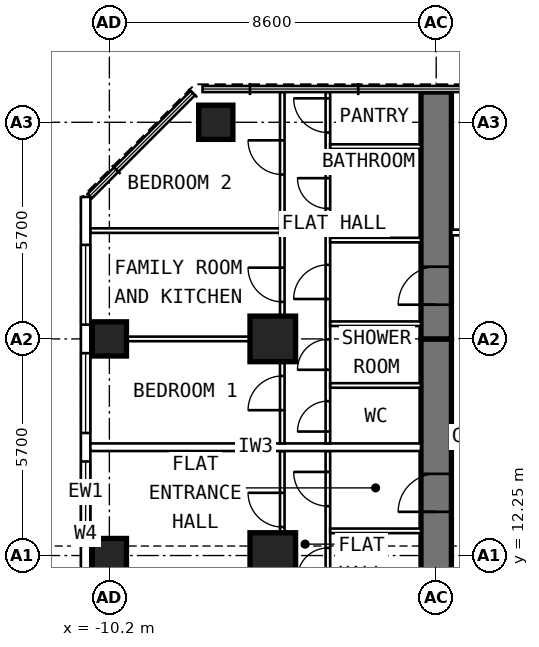
"""IFC4 building model, lengths in metres.
Left out: names, types, materials, properties, quantities, classifications, styles, units other than length and angle.
Written with IfcOpenShell. Run it as: python <this file> out.ifc"""

import sys

from ifc_helpers import new_model, si_unit, direction, frame, frame_2d, origin, origin_2d, place, context, subcontext, project, spatial, rectangle, extrude, element, fill, save


model = new_model("IFC4")
c1 = context("Model", 3, precision=1e-05, world=origin(), true_north=direction((0.0, 1.0)))
c2 = subcontext(c1, "Body", "Model", "MODEL_VIEW")
j1 = project(units=[si_unit("LENGTHUNIT", "METRE"), si_unit("PLANEANGLEUNIT", "RADIAN")], contexts=[c1])
p1 = place(None, origin())
s1 = spatial("IfcSite", under=j1, at=p1, CompositionType="ELEMENT")
p2 = place(p1, origin())
s2 = spatial("IfcBuilding", under=s1, at=p2, CompositionType="ELEMENT")
p3 = place(p2, frame((0.0, 0.0, 165.2)))
s3 = spatial("IfcBuildingStorey", under=s2, at=p3, CompositionType="ELEMENT", Elevation=165.2)
for number, where, z_axis, x_axis in (
    (1, (-10.2, 12.25, 0.0), (0.0, 0.0, 1.0), (0.0, 1.0, 0.0)),
    (2, (-10.2, 17.95, 0.0), (0.0, 0.0, 1.0), (0.0, 1.0, 0.0)),
    (3, (-7.4, 23.65, 0.0), (0.0, 0.0, 1.0), (0.0, 1.0, 0.0)),
):
    element("IfcColumn", number, at=place(p3, frame(where, z_axis=z_axis, x_axis=x_axis)), inside=s3, PredefinedType="COLUMN", context=c2, shape_type="SweptSolid", body=[
        extrude(rectangle(XDim=0.9, YDim=0.9, at=origin_2d()), origin(), (0.0, 0.0, 1.0), 3.6),
    ])
for number, where, z_axis, x_axis in (
    (4, (-5.9, 12.25, 0.0), (0.0, 0.0, 1.0), (0.0, 1.0, 0.0)),
    (5, (-5.9, 17.95, 0.0), (0.0, 0.0, 1.0), (0.0, 1.0, 0.0)),
):
    element("IfcColumn", number, at=place(p3, frame(where, z_axis=z_axis, x_axis=x_axis)), inside=s3, PredefinedType="COLUMN", context=c2, shape_type="SweptSolid", body=[
        extrude(rectangle(XDim=1.2, YDim=1.2, at=origin_2d()), origin(), (0.0, 0.0, 1.0), 3.6),
    ])
p4 = place(p3, frame((-1.6, 9.6, 0.0), z_axis=(0.0, 0.0, 1.0), x_axis=(0.0, 1.0, 0.0)))
e6 = element("IfcWall", 6, at=p4, inside=s3, PredefinedType="SHEAR", context=c2, shape_type="SweptSolid", body=[
    extrude(rectangle(XDim=8.35, YDim=0.8, at=frame_2d((4.175, 0.0))), origin(), (0.0, 0.0, 1.0), 3.6),
])
p5 = place(p4, frame((3.8, 0.0, 0.0)))
e7 = element("IfcOpeningElement", 7, at=p5, cuts=e6, PredefinedType="OPENING", context=c2, shape_type="SweptSolid", body=[
    extrude(rectangle(XDim=1.0, YDim=2.1, at=frame_2d((0.5, 1.05))), frame((0.0, 0.412, 0.0), z_axis=(0.0, -1.0, 0.0), x_axis=(1.0, 0.0, 0.0)), (0.0, 0.0, 1.0), 0.824),
])
p6 = place(p3, frame((-1.6, 17.95, 0.0), z_axis=(0.0, 0.0, 1.0), x_axis=(0.0, 1.0, 0.0)))
e8 = element("IfcWall", 8, at=p6, inside=s3, PredefinedType="SHEAR", context=c2, shape_type="SweptSolid", body=[
    extrude(rectangle(XDim=6.495, YDim=0.8, at=frame_2d((3.248, 0.0))), origin(), (0.0, 0.0, 1.0), 3.6),
])
p7 = place(p6, frame((0.9, 0.0, 0.0)))
e9 = element("IfcOpeningElement", 9, at=p7, cuts=e8, PredefinedType="OPENING", context=c2, shape_type="SweptSolid", body=[
    extrude(rectangle(XDim=1.0, YDim=2.1, at=frame_2d((0.5, 1.05))), frame((0.0, 0.412, 0.0), z_axis=(0.0, -1.0, 0.0), x_axis=(1.0, 0.0, 0.0)), (0.0, 0.0, 1.0), 0.824),
])
p8 = place(p3, frame((-10.825, 6.148, 0.0), z_axis=(0.0, 0.0, 1.0), x_axis=(0.0, 1.0, 0.0)))
e10 = element("IfcWall", 10, at=p8, inside=s3, PredefinedType="SOLIDWALL", context=c2, shape_type="SweptSolid", body=[
    extrude(rectangle(XDim=15.537, YDim=0.25, at=frame_2d((7.769, 0.0))), origin(), (0.0, 0.0, 1.0), 3.35),
])
p9 = place(p8, frame((0.777, 0.0, 0.8)))
e11 = element("IfcOpeningElement", 11, at=p9, cuts=e10, PredefinedType="OPENING", context=c2, shape_type="SweptSolid", body=[
    extrude(rectangle(XDim=2.1, YDim=1.8, at=frame_2d((1.05, 0.9))), frame((0.0, 0.137, 0.0), z_axis=(0.0, -1.0, 0.0), x_axis=(1.0, 0.0, 0.0)), (0.0, 0.0, 1.0), 0.274),
])
p10 = place(p8, frame((3.627, 0.0, 0.8)))
e12 = element("IfcOpeningElement", 12, at=p10, cuts=e10, PredefinedType="OPENING", context=c2, shape_type="SweptSolid", body=[
    extrude(rectangle(XDim=2.1, YDim=1.8, at=frame_2d((1.05, 0.9))), frame((0.0, 0.137, 0.0), z_axis=(0.0, -1.0, 0.0), x_axis=(1.0, 0.0, 0.0)), (0.0, 0.0, 1.0), 0.274),
])
p11 = place(p8, frame((6.477, 0.0, 0.8)))
e13 = element("IfcOpeningElement", 13, at=p11, cuts=e10, PredefinedType="OPENING", context=c2, shape_type="SweptSolid", body=[
    extrude(rectangle(XDim=2.1, YDim=1.8, at=frame_2d((1.05, 0.9))), frame((0.0, 0.137, 0.0), z_axis=(0.0, -1.0, 0.0), x_axis=(1.0, 0.0, 0.0)), (0.0, 0.0, 1.0), 0.274),
])
p12 = place(p8, frame((9.327, 0.0, 0.8)))
e14 = element("IfcOpeningElement", 14, at=p12, cuts=e10, PredefinedType="OPENING", context=c2, shape_type="SweptSolid", body=[
    extrude(rectangle(XDim=2.1, YDim=1.8, at=frame_2d((1.05, 0.9))), frame((0.0, 0.137, 0.0), z_axis=(0.0, -1.0, 0.0), x_axis=(1.0, 0.0, 0.0)), (0.0, 0.0, 1.0), 0.274),
])
p13 = place(p8, frame((12.177, 0.0, 0.8)))
e15 = element("IfcOpeningElement", 15, at=p13, cuts=e10, PredefinedType="OPENING", context=c2, shape_type="SweptSolid", body=[
    extrude(rectangle(XDim=2.1, YDim=1.8, at=frame_2d((1.05, 0.9))), frame((0.0, 0.137, 0.0), z_axis=(0.0, -1.0, 0.0), x_axis=(1.0, 0.0, 0.0)), (0.0, 0.0, 1.0), 0.274),
])
p14 = place(p3, frame((-4.45, 10.05, 0.0), z_axis=(0.0, 0.0, 1.0), x_axis=(0.0, 1.0, 0.0)))
e16 = element("IfcWall", 16, at=p14, inside=s3, PredefinedType="PARTITIONING", context=c2, shape_type="SweptSolid", body=[
    extrude(rectangle(XDim=4.95, YDim=0.12, at=frame_2d((2.475, 0.0))), origin(), (0.0, 0.0, 1.0), 3.35),
])
p15 = place(p14, frame((1.6, 0.0, 0.0)))
e17 = element("IfcOpeningElement", 17, at=p15, cuts=e16, PredefinedType="OPENING", context=c2, shape_type="SweptSolid", body=[
    extrude(rectangle(XDim=0.8, YDim=2.1, at=frame_2d((0.4, 1.05))), frame((0.0, 0.072, 0.0), z_axis=(0.0, -1.0, 0.0), x_axis=(1.0, 0.0, 0.0)), (0.0, 0.0, 1.0), 0.144),
])
p16 = place(p14, frame((3.5, 0.0, 0.0)))
e18 = element("IfcOpeningElement", 18, at=p16, cuts=e16, PredefinedType="OPENING", context=c2, shape_type="SweptSolid", body=[
    extrude(rectangle(XDim=0.9, YDim=2.1, at=frame_2d((0.45, 1.05))), frame((0.0, 0.072, 0.0), z_axis=(0.0, -1.0, 0.0), x_axis=(1.0, 0.0, 0.0)), (0.0, 0.0, 1.0), 0.144),
])
p17 = place(p3, frame((-5.65, 9.6, 0.0), z_axis=(0.0, 0.0, 1.0), x_axis=(0.0, 1.0, 0.0)))
e19 = element("IfcWall", 19, at=p17, inside=s3, PredefinedType="PARTITIONING", context=c2, shape_type="SweptSolid", body=[
    extrude(rectangle(XDim=5.4, YDim=0.12, at=frame_2d((2.7, 0.0))), origin(), (0.0, 0.0, 1.0), 3.35),
])
p18 = place(p17, frame((3.4, 0.0, 0.0)))
e20 = element("IfcOpeningElement", 20, at=p18, cuts=e19, PredefinedType="OPENING", context=c2, shape_type="SweptSolid", body=[
    extrude(rectangle(XDim=0.9, YDim=2.1, at=frame_2d((0.45, 1.05))), frame((0.0, 0.072, 0.0), z_axis=(0.0, -1.0, 0.0), x_axis=(1.0, 0.0, 0.0)), (0.0, 0.0, 1.0), 0.144),
])
p19 = place(p3, frame((-2.0, 12.9, 0.0), z_axis=(0.0, 0.0, 1.0), x_axis=(-1.0, 0.0, 0.0)))
e21 = element("IfcWall", 21, at=p19, inside=s3, PredefinedType="PARTITIONING", context=c2, shape_type="SweptSolid", body=[
    extrude(rectangle(XDim=2.39, YDim=0.12, at=frame_2d((1.195, 0.0))), origin(), (0.0, 0.0, 1.0), 3.35),
])
p20 = place(p3, frame((-4.45, 15.2, 0.0), z_axis=(0.0, 0.0, 1.0), x_axis=(0.0, 1.0, 0.0)))
e22 = element("IfcWall", 22, at=p20, inside=s3, PredefinedType="PARTITIONING", context=c2, shape_type="SweptSolid", body=[
    extrude(rectangle(XDim=9.245, YDim=0.12, at=frame_2d((4.623, 0.0))), origin(), (0.0, 0.0, 1.0), 3.35),
])
p21 = place(p20, frame((0.312, 0.0, 0.0)))
e23 = element("IfcOpeningElement", 23, at=p21, cuts=e22, PredefinedType="OPENING", context=c2, shape_type="SweptSolid", body=[
    extrude(rectangle(XDim=0.8, YDim=2.1, at=frame_2d((0.4, 1.05))), frame((0.0, 0.072, 0.0), z_axis=(0.0, -1.0, 0.0), x_axis=(1.0, 0.0, 0.0)), (0.0, 0.0, 1.0), 0.144),
])
p22 = place(p20, frame((1.938, 0.0, 0.0)))
e24 = element("IfcOpeningElement", 24, at=p22, cuts=e22, PredefinedType="OPENING", context=c2, shape_type="SweptSolid", body=[
    extrude(rectangle(XDim=0.8, YDim=2.1, at=frame_2d((0.4, 1.05))), frame((0.0, 0.072, 0.0), z_axis=(0.0, -1.0, 0.0), x_axis=(1.0, 0.0, 0.0)), (0.0, 0.0, 1.0), 0.144),
])
p23 = place(p20, frame((3.8, 0.0, 0.0)))
e25 = element("IfcOpeningElement", 25, at=p23, cuts=e22, PredefinedType="OPENING", context=c2, shape_type="SweptSolid", body=[
    extrude(rectangle(XDim=0.9, YDim=2.1, at=frame_2d((0.45, 1.05))), frame((0.0, 0.072, 0.0), z_axis=(0.0, -1.0, 0.0), x_axis=(1.0, 0.0, 0.0)), (0.0, 0.0, 1.0), 0.144),
])
p24 = place(p20, frame((6.18, 0.0, 0.0)))
e26 = element("IfcOpeningElement", 26, at=p24, cuts=e22, PredefinedType="OPENING", context=c2, shape_type="SweptSolid", body=[
    extrude(rectangle(XDim=0.8, YDim=2.1, at=frame_2d((0.4, 1.05))), frame((0.0, 0.072, 0.0), z_axis=(0.0, -1.0, 0.0), x_axis=(1.0, 0.0, 0.0)), (0.0, 0.0, 1.0), 0.144),
])
p25 = place(p20, frame((8.18, 0.0, 0.0)))
e27 = element("IfcOpeningElement", 27, at=p25, cuts=e22, PredefinedType="OPENING", context=c2, shape_type="SweptSolid", body=[
    extrude(rectangle(XDim=0.9, YDim=2.1, at=frame_2d((0.45, 1.05))), frame((0.0, 0.072, 0.0), z_axis=(0.0, -1.0, 0.0), x_axis=(1.0, 0.0, 0.0)), (0.0, 0.0, 1.0), 0.144),
])
p26 = place(p3, frame((-5.65, 15.2, 0.0), z_axis=(0.0, 0.0, 1.0), x_axis=(0.0, 1.0, 0.0)))
e28 = element("IfcWall", 28, at=p26, inside=s3, PredefinedType="PARTITIONING", context=c2, shape_type="SweptSolid", body=[
    extrude(rectangle(XDim=9.245, YDim=0.12, at=frame_2d((4.623, 0.0))), origin(), (0.0, 0.0, 1.0), 3.35),
])
p27 = place(p26, frame((0.875, 0.0, 0.0)))
e29 = element("IfcOpeningElement", 29, at=p27, cuts=e28, PredefinedType="OPENING", context=c2, shape_type="SweptSolid", body=[
    extrude(rectangle(XDim=0.9, YDim=2.1, at=frame_2d((0.45, 1.05))), frame((0.0, 0.072, 0.0), z_axis=(0.0, -1.0, 0.0), x_axis=(1.0, 0.0, 0.0)), (0.0, 0.0, 1.0), 0.144),
])
p28 = place(p26, frame((3.725, 0.0, 0.0)))
e30 = element("IfcOpeningElement", 30, at=p28, cuts=e28, PredefinedType="OPENING", context=c2, shape_type="SweptSolid", body=[
    extrude(rectangle(XDim=0.9, YDim=2.1, at=frame_2d((0.45, 1.05))), frame((0.0, 0.072, 0.0), z_axis=(0.0, -1.0, 0.0), x_axis=(1.0, 0.0, 0.0)), (0.0, 0.0, 1.0), 0.144),
])
p29 = place(p26, frame((7.075, 0.0, 0.0)))
e31 = element("IfcOpeningElement", 31, at=p29, cuts=e28, PredefinedType="OPENING", context=c2, shape_type="SweptSolid", body=[
    extrude(rectangle(XDim=0.9, YDim=2.1, at=frame_2d((0.45, 1.05))), frame((0.0, 0.072, 0.0), z_axis=(0.0, -1.0, 0.0), x_axis=(1.0, 0.0, 0.0)), (0.0, 0.0, 1.0), 0.144),
])
p30 = place(p3, frame((-5.71, 17.95, 0.0), z_axis=(0.0, 0.0, 1.0), x_axis=(-1.0, 0.0, 0.0)))
e32 = element("IfcWall", 32, at=p30, inside=s3, PredefinedType="PARTITIONING", context=c2, shape_type="SweptSolid", body=[
    extrude(rectangle(XDim=4.99, YDim=0.12, at=frame_2d((2.495, 0.0))), origin(), (0.0, 0.0, 1.0), 2.45),
])
p31 = place(p3, frame((-5.71, 20.8, 0.0), z_axis=(0.0, 0.0, 1.0), x_axis=(-1.0, 0.0, 0.0)))
e33 = element("IfcWall", 33, at=p31, inside=s3, PredefinedType="PARTITIONING", context=c2, shape_type="SweptSolid", body=[
    extrude(rectangle(XDim=4.99, YDim=0.12, at=frame_2d((2.495, 0.0))), origin(), (0.0, 0.0, 1.0), 3.35),
])
for number, where, z_axis, x_axis in (
    (34, (-2.0, 16.725, 0.0), (0.0, 0.0, 1.0), (-1.0, 0.0, 0.0)),
    (35, (-2.0, 18.35, 0.0), (0.0, 0.0, 1.0), (-1.0, 0.0, 0.0)),
    (36, (-2.0, 20.55, 0.0), (0.0, 0.0, 1.0), (-1.0, 0.0, 0.0)),
    (37, (-2.0, 23.01, 0.0), (0.0, 0.0, 1.0), (-1.0, 0.0, 0.0)),
):
    element("IfcWall", number, at=place(p3, frame(where, z_axis=z_axis, x_axis=x_axis)), inside=s3, PredefinedType="PARTITIONING", context=c2, shape_type="SweptSolid", body=[
        extrude(rectangle(XDim=2.39, YDim=0.12, at=frame_2d((1.195, 0.0))), origin(), (0.0, 0.0, 1.0), 3.35),
    ])
p32 = place(p3, frame((-2.0, 15.1, 0.0), z_axis=(0.0, 0.0, 1.0), x_axis=(-1.0, 0.0, 0.0)))
e38 = element("IfcWall", 38, at=p32, inside=s3, PredefinedType="PARTITIONING", context=c2, shape_type="SweptSolid", body=[
    extrude(rectangle(XDim=8.7, YDim=0.2, at=frame_2d((4.35, 0.0))), origin(), (0.0, 0.0, 1.0), 3.35),
])
p33 = place(p3, frame((1.2, 20.75, 0.0), z_axis=(0.0, 0.0, 1.0), x_axis=(-1.0, 0.0, 0.0)))
e39 = element("IfcWall", 39, at=p33, inside=s3, PredefinedType="PARTITIONING", context=c2, shape_type="SweptSolid", body=[
    extrude(rectangle(XDim=2.4, YDim=0.15, at=frame_2d((1.2, 0.0))), origin(), (0.0, 0.0, 1.0), 3.35),
])
p34 = place(p33, frame((0.7, 0.0, 0.0)))
e40 = element("IfcOpeningElement", 40, at=p34, cuts=e39, PredefinedType="OPENING", context=c2, shape_type="SweptSolid", body=[
    extrude(rectangle(XDim=1.0, YDim=2.1, at=frame_2d((0.5, 1.05))), frame((0.0, 0.087, 0.0), z_axis=(0.0, -1.0, 0.0), x_axis=(1.0, 0.0, 0.0)), (0.0, 0.0, 1.0), 0.174),
])
p35 = place(p11, origin())
e41 = element("IfcWindow", 41, at=p35, inside=s3, PartitioningType="SINGLE_PANEL", PredefinedType="WINDOW", context=c2, shape_type="SweptSolid", body=[
    extrude(rectangle(XDim=2.1, YDim=1.8, at=frame_2d((1.05, 0.9))), frame((0.0, 0.03, 0.0), z_axis=(0.0, -1.0, 0.0), x_axis=(1.0, 0.0, 0.0)), (0.0, 0.0, 1.0), 0.06),
])
fill(e13, e41)
p36 = place(p12, origin())
e42 = element("IfcWindow", 42, at=p36, inside=s3, PartitioningType="SINGLE_PANEL", PredefinedType="WINDOW", context=c2, shape_type="SweptSolid", body=[
    extrude(rectangle(XDim=2.1, YDim=1.8, at=frame_2d((1.05, 0.9))), frame((0.0, 0.03, 0.0), z_axis=(0.0, -1.0, 0.0), x_axis=(1.0, 0.0, 0.0)), (0.0, 0.0, 1.0), 0.06),
])
fill(e14, e42)
p37 = place(p13, origin())
e43 = element("IfcWindow", 43, at=p37, inside=s3, PartitioningType="SINGLE_PANEL", PredefinedType="WINDOW", context=c2, shape_type="SweptSolid", body=[
    extrude(rectangle(XDim=2.1, YDim=1.8, at=frame_2d((1.05, 0.9))), frame((0.0, 0.03, 0.0), z_axis=(0.0, -1.0, 0.0), x_axis=(1.0, 0.0, 0.0)), (0.0, 0.0, 1.0), 0.06),
])
fill(e15, e43)
p38 = place(p5, origin())
e44 = element("IfcDoor", 44, at=p38, inside=s3, OperationType="SINGLE_SWING_LEFT", PredefinedType="DOOR", context=c2, shape_type="SweptSolid", body=[
    extrude(rectangle(XDim=1.0, YDim=2.1, at=frame_2d((0.5, 1.05))), frame((0.0, 0.15, 0.0), z_axis=(0.0, -1.0, 0.0), x_axis=(1.0, 0.0, 0.0)), (0.0, 0.0, 1.0), 0.3),
])
fill(e7, e44)
p39 = place(p18, origin())
e45 = element("IfcDoor", 45, at=p39, inside=s3, OperationType="SINGLE_SWING_RIGHT", PredefinedType="DOOR", context=c2, shape_type="SweptSolid", body=[
    extrude(rectangle(XDim=0.9, YDim=2.1, at=frame_2d((0.45, 1.05))), frame((0.0, 0.025, 0.0), z_axis=(0.0, -1.0, 0.0), x_axis=(1.0, 0.0, 0.0)), (0.0, 0.0, 1.0), 0.05),
])
fill(e20, e45)
p40 = place(p15, origin())
e46 = element("IfcDoor", 46, at=p40, inside=s3, OperationType="SINGLE_SWING_LEFT", PredefinedType="DOOR", context=c2, shape_type="SweptSolid", body=[
    extrude(rectangle(XDim=0.8, YDim=2.1, at=frame_2d((0.4, 1.05))), frame((0.0, 0.025, 0.0), z_axis=(0.0, -1.0, 0.0), x_axis=(1.0, 0.0, 0.0)), (0.0, 0.0, 1.0), 0.05),
])
fill(e17, e46)
p41 = place(p16, origin())
e47 = element("IfcDoor", 47, at=p41, inside=s3, OperationType="SINGLE_SWING_RIGHT", PredefinedType="DOOR", context=c2, shape_type="SweptSolid", body=[
    extrude(rectangle(XDim=0.9, YDim=2.1, at=frame_2d((0.45, 1.05))), frame((0.0, 0.025, 0.0), z_axis=(0.0, -1.0, 0.0), x_axis=(1.0, 0.0, 0.0)), (0.0, 0.0, 1.0), 0.05),
])
fill(e18, e47)
p42 = place(p7, origin())
e48 = element("IfcDoor", 48, at=p42, inside=s3, OperationType="SINGLE_SWING_LEFT", PredefinedType="DOOR", context=c2, shape_type="SweptSolid", body=[
    extrude(rectangle(XDim=1.0, YDim=2.1, at=frame_2d((0.5, 1.05))), frame((0.0, 0.15, 0.0), z_axis=(0.0, -1.0, 0.0), x_axis=(1.0, 0.0, 0.0)), (0.0, 0.0, 1.0), 0.3),
])
fill(e9, e48)
p43 = place(p27, origin())
e49 = element("IfcDoor", 49, at=p43, inside=s3, OperationType="SINGLE_SWING_LEFT", PredefinedType="DOOR", context=c2, shape_type="SweptSolid", body=[
    extrude(rectangle(XDim=0.9, YDim=2.1, at=frame_2d((0.45, 1.05))), frame((0.0, 0.025, 0.0), z_axis=(0.0, -1.0, 0.0), x_axis=(1.0, 0.0, 0.0)), (0.0, 0.0, 1.0), 0.05),
])
fill(e29, e49)
p44 = place(p28, origin())
e50 = element("IfcDoor", 50, at=p44, inside=s3, OperationType="SINGLE_SWING_RIGHT", PredefinedType="DOOR", context=c2, shape_type="SweptSolid", body=[
    extrude(rectangle(XDim=0.9, YDim=2.1, at=frame_2d((0.45, 1.05))), frame((0.0, 0.025, 0.0), z_axis=(0.0, -1.0, 0.0), x_axis=(1.0, 0.0, 0.0)), (0.0, 0.0, 1.0), 0.05),
])
fill(e30, e50)
p45 = place(p29, origin())
e51 = element("IfcDoor", 51, at=p45, inside=s3, OperationType="SINGLE_SWING_RIGHT", PredefinedType="DOOR", context=c2, shape_type="SweptSolid", body=[
    extrude(rectangle(XDim=0.9, YDim=2.1, at=frame_2d((0.45, 1.05))), frame((0.0, 0.025, 0.0), z_axis=(0.0, -1.0, 0.0), x_axis=(1.0, 0.0, 0.0)), (0.0, 0.0, 1.0), 0.05),
])
fill(e31, e51)
p46 = place(p21, origin())
e52 = element("IfcDoor", 52, at=p46, inside=s3, OperationType="SINGLE_SWING_LEFT", PredefinedType="DOOR", context=c2, shape_type="SweptSolid", body=[
    extrude(rectangle(XDim=0.8, YDim=2.1, at=frame_2d((0.4, 1.05))), frame((0.0, 0.025, 0.0), z_axis=(0.0, -1.0, 0.0), x_axis=(1.0, 0.0, 0.0)), (0.0, 0.0, 1.0), 0.05),
])
fill(e23, e52)
p47 = place(p22, origin())
e53 = element("IfcDoor", 53, at=p47, inside=s3, OperationType="SINGLE_SWING_LEFT", PredefinedType="DOOR", context=c2, shape_type="SweptSolid", body=[
    extrude(rectangle(XDim=0.8, YDim=2.1, at=frame_2d((0.4, 1.05))), frame((0.0, 0.025, 0.0), z_axis=(0.0, -1.0, 0.0), x_axis=(1.0, 0.0, 0.0)), (0.0, 0.0, 1.0), 0.05),
])
fill(e24, e53)
p48 = place(p23, origin())
e54 = element("IfcDoor", 54, at=p48, inside=s3, OperationType="SINGLE_SWING_LEFT", PredefinedType="DOOR", context=c2, shape_type="SweptSolid", body=[
    extrude(rectangle(XDim=0.9, YDim=2.1, at=frame_2d((0.45, 1.05))), frame((0.0, 0.025, 0.0), z_axis=(0.0, -1.0, 0.0), x_axis=(1.0, 0.0, 0.0)), (0.0, 0.0, 1.0), 0.05),
])
fill(e25, e54)
p49 = place(p24, origin())
e55 = element("IfcDoor", 55, at=p49, inside=s3, OperationType="SINGLE_SWING_RIGHT", PredefinedType="DOOR", context=c2, shape_type="SweptSolid", body=[
    extrude(rectangle(XDim=0.8, YDim=2.1, at=frame_2d((0.4, 1.05))), frame((0.0, 0.025, 0.0), z_axis=(0.0, -1.0, 0.0), x_axis=(1.0, 0.0, 0.0)), (0.0, 0.0, 1.0), 0.05),
])
fill(e26, e55)
p50 = place(p25, origin())
e56 = element("IfcDoor", 56, at=p50, inside=s3, OperationType="SINGLE_SWING_RIGHT", PredefinedType="DOOR", context=c2, shape_type="SweptSolid", body=[
    extrude(rectangle(XDim=0.9, YDim=2.1, at=frame_2d((0.45, 1.05))), frame((0.0, 0.025, 0.0), z_axis=(0.0, -1.0, 0.0), x_axis=(1.0, 0.0, 0.0)), (0.0, 0.0, 1.0), 0.05),
])
fill(e27, e56)
save(model, sys.argv[1])
